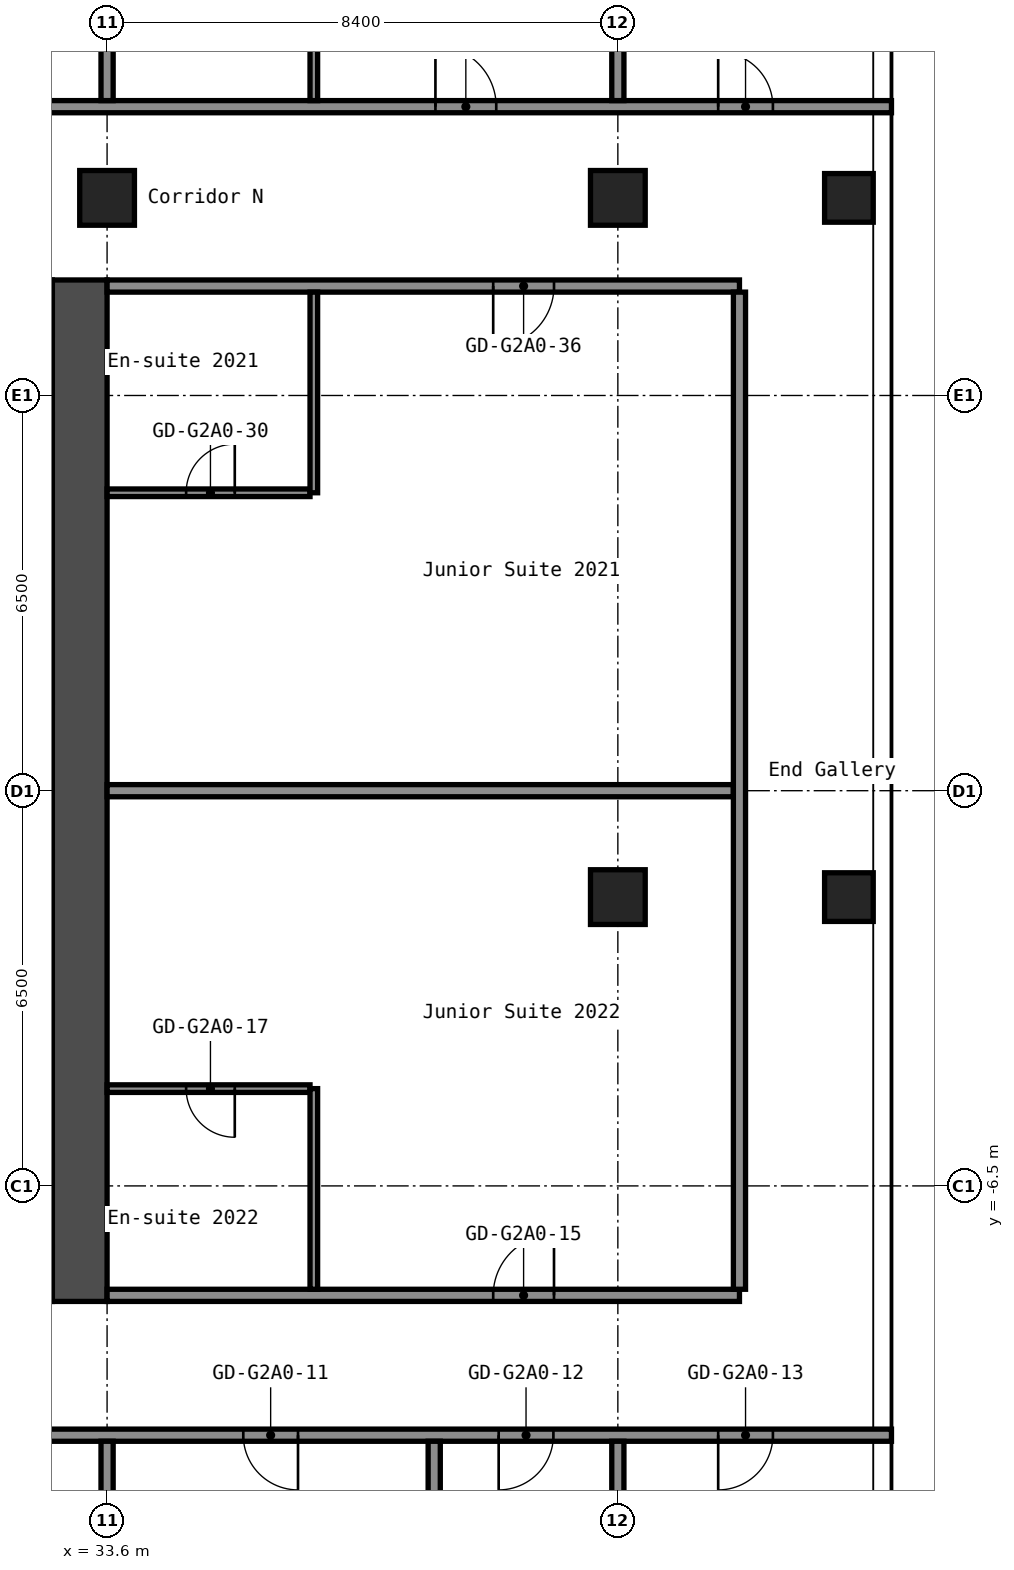
"""IFC4 building model, lengths in metres.
Left out: names, types, materials, properties, quantities, classifications, styles, units other than length and angle.
Written with IfcOpenShell. Run it as: python <this file> out.ifc"""

import sys

from ifc_helpers import new_model, si_unit, direction, frame, frame_2d, origin, origin_2d, place, context, subcontext, project, spatial, rectangle, hollow_rectangle, extrude, element, fill, save


model = new_model("IFC4")
c1 = context("Model", 3, precision=1e-05, world=origin(), true_north=direction((0.0, 1.0)))
c2 = subcontext(c1, "Body", "Model", "MODEL_VIEW")
j1 = project(units=[si_unit("LENGTHUNIT", "METRE"), si_unit("PLANEANGLEUNIT", "RADIAN")], contexts=[c1])
p1 = place(None, origin())
s1 = spatial("IfcSite", under=j1, at=p1, CompositionType="ELEMENT")
p2 = place(p1, origin())
s2 = spatial("IfcBuilding", under=s1, at=p2, CompositionType="ELEMENT")
p3 = place(p2, frame((0.0, 0.0, 75.4)))
s3 = spatial("IfcBuildingStorey", under=s2, at=p3, CompositionType="ELEMENT", Elevation=75.4)
for number, where, z_axis, x_axis in (
    (1, (33.6, 9.75, 0.0), (0.0, 0.0, 1.0), (1.0, 0.0, 0.0)),
    (2, (42.0, -1.75, 0.0), (0.0, 0.0, 1.0), (1.0, 0.0, 0.0)),
    (3, (42.0, 9.75, 0.0), (0.0, 0.0, 1.0), (1.0, 0.0, 0.0)),
):
    element("IfcColumn", number, at=place(p3, frame(where, z_axis=z_axis, x_axis=x_axis)), inside=s3, PredefinedType="COLUMN", context=c2, shape_type="SweptSolid", body=[
        extrude(hollow_rectangle(XDim=0.9, YDim=0.9, WallThickness=0.036, at=origin_2d()), origin(), (0.0, 0.0, 1.0), 2.8),
    ])
for number, where, z_axis, x_axis in (
    (4, (45.8, -1.75, 0.0), (0.0, 0.0, 1.0), (1.0, 0.0, 0.0)),
    (5, (45.8, 9.75, 0.0), (0.0, 0.0, 1.0), (1.0, 0.0, 0.0)),
):
    element("IfcColumn", number, at=place(p3, frame(where, z_axis=z_axis, x_axis=x_axis)), inside=s3, PredefinedType="COLUMN", context=c2, shape_type="SweptSolid", body=[
        extrude(hollow_rectangle(XDim=0.8, YDim=0.8, WallThickness=0.032, at=origin_2d()), origin(), (0.0, 0.0, 1.0), 2.8),
    ])
p4 = place(p3, frame((33.15, -8.4, 0.0), z_axis=(0.0, 0.0, 1.0), x_axis=(0.0, 1.0, 0.0)))
e6 = element("IfcWall", 6, at=p4, inside=s3, PredefinedType="SHEAR", context=c2, shape_type="SweptSolid", body=[
    extrude(rectangle(XDim=16.8, YDim=0.9, at=frame_2d((8.4, 0.0))), origin(), (0.0, 0.0, 1.0), 2.8),
])
p5 = place(p3, frame((16.8, -10.6, 0.0), z_axis=(0.0, 0.0, 1.0), x_axis=(1.0, 0.0, 0.0)))
e7 = element("IfcWall", 7, at=p5, inside=s3, PredefinedType="PARTITIONING", context=c2, shape_type="SweptSolid", body=[
    extrude(rectangle(XDim=29.7, YDim=0.2, at=frame_2d((14.85, 0.0))), origin(), (0.0, 0.0, 1.0), 2.8),
])
p6 = place(p5, frame((1.145, 0.0, 0.0)))
e8 = element("IfcOpeningElement", 8, at=p6, cuts=e7, PredefinedType="OPENING", context=c2, shape_type="SweptSolid", body=[
    extrude(rectangle(XDim=0.9, YDim=2.1, at=frame_2d((0.45, 1.05))), frame((0.0, 0.11, 0.0), z_axis=(0.0, -1.0, 0.0), x_axis=(1.0, 0.0, 0.0)), (0.0, 0.0, 1.0), 0.22),
])
p7 = place(p5, frame((5.345, 0.0, 0.0)))
e9 = element("IfcOpeningElement", 9, at=p7, cuts=e7, PredefinedType="OPENING", context=c2, shape_type="SweptSolid", body=[
    extrude(rectangle(XDim=0.9, YDim=2.1, at=frame_2d((0.45, 1.05))), frame((0.0, 0.11, 0.0), z_axis=(0.0, -1.0, 0.0), x_axis=(1.0, 0.0, 0.0)), (0.0, 0.0, 1.0), 0.22),
])
p8 = place(p5, frame((9.46, 0.0, 0.0)))
e10 = element("IfcOpeningElement", 10, at=p8, cuts=e7, PredefinedType="OPENING", context=c2, shape_type="SweptSolid", body=[
    extrude(rectangle(XDim=0.9, YDim=2.1, at=frame_2d((0.45, 1.05))), frame((0.0, 0.11, 0.0), z_axis=(0.0, -1.0, 0.0), x_axis=(1.0, 0.0, 0.0)), (0.0, 0.0, 1.0), 0.22),
])
p9 = place(p5, frame((13.66, 0.0, 0.0)))
e11 = element("IfcOpeningElement", 11, at=p9, cuts=e7, PredefinedType="OPENING", context=c2, shape_type="SweptSolid", body=[
    extrude(rectangle(XDim=0.9, YDim=2.1, at=frame_2d((0.45, 1.05))), frame((0.0, 0.11, 0.0), z_axis=(0.0, -1.0, 0.0), x_axis=(1.0, 0.0, 0.0)), (0.0, 0.0, 1.0), 0.22),
])
p10 = place(p5, frame((19.04, 0.0, 0.0)))
e12 = element("IfcOpeningElement", 12, at=p10, cuts=e7, PredefinedType="OPENING", context=c2, shape_type="SweptSolid", body=[
    extrude(rectangle(XDim=0.9, YDim=2.1, at=frame_2d((0.45, 1.05))), frame((0.0, 0.11, 0.0), z_axis=(0.0, -1.0, 0.0), x_axis=(1.0, 0.0, 0.0)), (0.0, 0.0, 1.0), 0.22),
])
p11 = place(p5, frame((23.24, 0.0, 0.0)))
e13 = element("IfcOpeningElement", 13, at=p11, cuts=e7, PredefinedType="OPENING", context=c2, shape_type="SweptSolid", body=[
    extrude(rectangle(XDim=0.9, YDim=2.1, at=frame_2d((0.45, 1.05))), frame((0.0, 0.11, 0.0), z_axis=(0.0, -1.0, 0.0), x_axis=(1.0, 0.0, 0.0)), (0.0, 0.0, 1.0), 0.22),
])
p12 = place(p5, frame((26.85, 0.0, 0.0)))
e14 = element("IfcOpeningElement", 14, at=p12, cuts=e7, PredefinedType="OPENING", context=c2, shape_type="SweptSolid", body=[
    extrude(rectangle(XDim=0.9, YDim=2.1, at=frame_2d((0.45, 1.05))), frame((0.0, 0.11, 0.0), z_axis=(0.0, -1.0, 0.0), x_axis=(1.0, 0.0, 0.0)), (0.0, 0.0, 1.0), 0.22),
])
p13 = place(p3, frame((33.6, -8.3, 0.0), z_axis=(0.0, 0.0, 1.0), x_axis=(1.0, 0.0, 0.0)))
e15 = element("IfcWall", 15, at=p13, inside=s3, PredefinedType="PARTITIONING", context=c2, shape_type="SweptSolid", body=[
    extrude(rectangle(XDim=10.4, YDim=0.2, at=frame_2d((5.2, 0.0))), origin(), (0.0, 0.0, 1.0), 2.8),
])
p14 = place(p13, frame((6.35, 0.0, 0.0)))
e16 = element("IfcOpeningElement", 16, at=p14, cuts=e15, PredefinedType="OPENING", context=c2, shape_type="SweptSolid", body=[
    extrude(rectangle(XDim=1.0, YDim=2.1, at=frame_2d((0.5, 1.05))), frame((0.0, 0.11, 0.0), z_axis=(0.0, -1.0, 0.0), x_axis=(1.0, 0.0, 0.0)), (0.0, 0.0, 1.0), 0.22),
])
p15 = place(p3, frame((33.6, -4.9, 0.0), z_axis=(0.0, 0.0, 1.0), x_axis=(1.0, 0.0, 0.0)))
e17 = element("IfcWall", 17, at=p15, inside=s3, PredefinedType="PARTITIONING", context=c2, shape_type="SweptSolid", body=[
    extrude(rectangle(XDim=3.337, YDim=0.125, at=frame_2d((1.669, 0.0))), origin(), (0.0, 0.0, 1.0), 2.8),
])
p16 = place(p15, frame((1.3, 0.0, 0.0)))
e18 = element("IfcOpeningElement", 18, at=p16, cuts=e17, PredefinedType="OPENING", context=c2, shape_type="SweptSolid", body=[
    extrude(rectangle(XDim=0.8, YDim=2.1, at=frame_2d((0.4, 1.05))), frame((0.0, 0.073, 0.0), z_axis=(0.0, -1.0, 0.0), x_axis=(1.0, 0.0, 0.0)), (0.0, 0.0, 1.0), 0.145),
])
p17 = place(p3, frame((33.6, 0.0, 0.0), z_axis=(0.0, 0.0, 1.0), x_axis=(1.0, 0.0, 0.0)))
e19 = element("IfcWall", 19, at=p17, inside=s3, PredefinedType="PARTITIONING", context=c2, shape_type="SweptSolid", body=[
    extrude(rectangle(XDim=10.3, YDim=0.2, at=frame_2d((5.15, 0.0))), origin(), (0.0, 0.0, 1.0), 2.8),
])
p18 = place(p3, frame((33.6, 4.9, 0.0), z_axis=(0.0, 0.0, 1.0), x_axis=(1.0, 0.0, 0.0)))
e20 = element("IfcWall", 20, at=p18, inside=s3, PredefinedType="PARTITIONING", context=c2, shape_type="SweptSolid", body=[
    extrude(rectangle(XDim=3.337, YDim=0.125, at=frame_2d((1.669, 0.0))), origin(), (0.0, 0.0, 1.0), 2.8),
])
p19 = place(p18, frame((1.3, 0.0, 0.0)))
e21 = element("IfcOpeningElement", 21, at=p19, cuts=e20, PredefinedType="OPENING", context=c2, shape_type="SweptSolid", body=[
    extrude(rectangle(XDim=0.8, YDim=2.1, at=frame_2d((0.4, 1.05))), frame((0.0, 0.073, 0.0), z_axis=(0.0, -1.0, 0.0), x_axis=(1.0, 0.0, 0.0)), (0.0, 0.0, 1.0), 0.145),
])
p20 = place(p3, frame((33.6, 8.3, 0.0), z_axis=(0.0, 0.0, 1.0), x_axis=(1.0, 0.0, 0.0)))
e22 = element("IfcWall", 22, at=p20, inside=s3, PredefinedType="PARTITIONING", context=c2, shape_type="SweptSolid", body=[
    extrude(rectangle(XDim=10.4, YDim=0.2, at=frame_2d((5.2, 0.0))), origin(), (0.0, 0.0, 1.0), 2.8),
])
p21 = place(p20, frame((6.35, 0.0, 0.0)))
e23 = element("IfcOpeningElement", 23, at=p21, cuts=e22, PredefinedType="OPENING", context=c2, shape_type="SweptSolid", body=[
    extrude(rectangle(XDim=1.0, YDim=2.1, at=frame_2d((0.5, 1.05))), frame((0.0, 0.11, 0.0), z_axis=(0.0, -1.0, 0.0), x_axis=(1.0, 0.0, 0.0)), (0.0, 0.0, 1.0), 0.22),
])
p22 = place(p3, frame((16.8, 11.25, 0.0), z_axis=(0.0, 0.0, 1.0), x_axis=(1.0, 0.0, 0.0)))
e24 = element("IfcWall", 24, at=p22, inside=s3, PredefinedType="PARTITIONING", context=c2, shape_type="SweptSolid", body=[
    extrude(rectangle(XDim=29.7, YDim=0.2, at=frame_2d((14.85, 0.0))), origin(), (0.0, 0.0, 1.0), 2.8),
])
p23 = place(p22, frame((5.4, 0.0, 0.0)))
e25 = element("IfcOpeningElement", 25, at=p23, cuts=e24, PredefinedType="OPENING", context=c2, shape_type="SweptSolid", body=[
    extrude(rectangle(XDim=1.0, YDim=2.1, at=frame_2d((0.5, 1.05))), frame((0.0, 0.11, 0.0), z_axis=(0.0, -1.0, 0.0), x_axis=(1.0, 0.0, 0.0)), (0.0, 0.0, 1.0), 0.22),
])
p24 = place(p22, frame((13.8, 0.0, 0.0)))
e26 = element("IfcOpeningElement", 26, at=p24, cuts=e24, PredefinedType="OPENING", context=c2, shape_type="SweptSolid", body=[
    extrude(rectangle(XDim=1.0, YDim=2.1, at=frame_2d((0.5, 1.05))), frame((0.0, 0.11, 0.0), z_axis=(0.0, -1.0, 0.0), x_axis=(1.0, 0.0, 0.0)), (0.0, 0.0, 1.0), 0.22),
])
p25 = place(p22, frame((22.2, 0.0, 0.0)))
e27 = element("IfcOpeningElement", 27, at=p25, cuts=e24, PredefinedType="OPENING", context=c2, shape_type="SweptSolid", body=[
    extrude(rectangle(XDim=1.0, YDim=2.1, at=frame_2d((0.5, 1.05))), frame((0.0, 0.11, 0.0), z_axis=(0.0, -1.0, 0.0), x_axis=(1.0, 0.0, 0.0)), (0.0, 0.0, 1.0), 0.22),
])
p26 = place(p22, frame((26.85, 0.0, 0.0)))
e28 = element("IfcOpeningElement", 28, at=p26, cuts=e24, PredefinedType="OPENING", context=c2, shape_type="SweptSolid", body=[
    extrude(rectangle(XDim=0.9, YDim=2.1, at=frame_2d((0.45, 1.05))), frame((0.0, 0.11, 0.0), z_axis=(0.0, -1.0, 0.0), x_axis=(1.0, 0.0, 0.0)), (0.0, 0.0, 1.0), 0.22),
])
p27 = place(p3, frame((33.6, -15.55, 0.0), z_axis=(0.0, 0.0, 1.0), x_axis=(0.0, 1.0, 0.0)))
e29 = element("IfcWall", 29, at=p27, inside=s3, PredefinedType="PARTITIONING", context=c2, shape_type="SweptSolid", body=[
    extrude(rectangle(XDim=4.85, YDim=0.2, at=frame_2d((2.425, 0.0))), origin(), (0.0, 0.0, 1.0), 2.8),
])
p28 = place(p3, frame((33.6, 11.35, 0.0), z_axis=(0.0, 0.0, 1.0), x_axis=(0.0, 1.0, 0.0)))
e30 = element("IfcWall", 30, at=p28, inside=s3, PredefinedType="PARTITIONING", context=c2, shape_type="SweptSolid", body=[
    extrude(rectangle(XDim=12.2, YDim=0.2, at=frame_2d((6.1, 0.0))), origin(), (0.0, 0.0, 1.0), 2.8),
])
for number, where, z_axis, x_axis in (
    (31, (37.0, -8.2, 0.0), (0.0, 0.0, 1.0), (0.0, 1.0, 0.0)),
    (32, (37.0, 4.9, 0.0), (0.0, 0.0, 1.0), (0.0, 1.0, 0.0)),
):
    element("IfcWall", number, at=place(p3, frame(where, z_axis=z_axis, x_axis=x_axis)), inside=s3, PredefinedType="PARTITIONING", context=c2, shape_type="SweptSolid", body=[
        extrude(rectangle(XDim=3.3, YDim=0.125, at=frame_2d((1.65, 0.0))), origin(), (0.0, 0.0, 1.0), 2.8),
    ])
p29 = place(p3, frame((37.0, 11.35, 0.0), z_axis=(0.0, 0.0, 1.0), x_axis=(0.0, 1.0, 0.0)))
e33 = element("IfcWall", 33, at=p29, inside=s3, PredefinedType="PARTITIONING", context=c2, shape_type="SweptSolid", body=[
    extrude(rectangle(XDim=3.3, YDim=0.125, at=frame_2d((1.65, 0.0))), origin(), (0.0, 0.0, 1.0), 2.8),
])
for number, where, z_axis, x_axis in (
    (34, (38.98, -15.55, 0.0), (0.0, 0.0, 1.0), (0.0, 1.0, 0.0)),
    (35, (42.0, -15.55, 0.0), (0.0, 0.0, 1.0), (0.0, 1.0, 0.0)),
):
    element("IfcWall", number, at=place(p3, frame(where, z_axis=z_axis, x_axis=x_axis)), inside=s3, PredefinedType="PARTITIONING", context=c2, shape_type="SweptSolid", body=[
        extrude(rectangle(XDim=4.85, YDim=0.2, at=frame_2d((2.425, 0.0))), origin(), (0.0, 0.0, 1.0), 2.8),
    ])
p30 = place(p3, frame((42.0, 11.35, 0.0), z_axis=(0.0, 0.0, 1.0), x_axis=(0.0, 1.0, 0.0)))
e36 = element("IfcWall", 36, at=p30, inside=s3, PredefinedType="PARTITIONING", context=c2, shape_type="SweptSolid", body=[
    extrude(rectangle(XDim=12.2, YDim=0.2, at=frame_2d((6.1, 0.0))), origin(), (0.0, 0.0, 1.0), 2.8),
])
p31 = place(p3, frame((44.0, -8.2, 0.0), z_axis=(0.0, 0.0, 1.0), x_axis=(0.0, 1.0, 0.0)))
e37 = element("IfcWall", 37, at=p31, inside=s3, PredefinedType="PARTITIONING", context=c2, shape_type="SweptSolid", body=[
    extrude(rectangle(XDim=16.4, YDim=0.2, at=frame_2d((8.2, 0.0))), origin(), (0.0, 0.0, 1.0), 2.8),
])
p32 = place(p10, origin())
e38 = element("IfcDoor", 38, at=p32, inside=s3, OperationType="SINGLE_SWING_RIGHT", PredefinedType="DOOR", context=c2, shape_type="SweptSolid", body=[
    extrude(rectangle(XDim=0.9, YDim=2.1, at=frame_2d((0.45, 1.05))), frame((0.0, 0.025, 0.0), z_axis=(0.0, -1.0, 0.0), x_axis=(1.0, 0.0, 0.0)), (0.0, 0.0, 1.0), 0.05),
])
fill(e12, e38)
p33 = place(p11, origin())
e39 = element("IfcDoor", 39, at=p33, inside=s3, OperationType="SINGLE_SWING_LEFT", PredefinedType="DOOR", context=c2, shape_type="SweptSolid", body=[
    extrude(rectangle(XDim=0.9, YDim=2.1, at=frame_2d((0.45, 1.05))), frame((0.0, 0.025, 0.0), z_axis=(0.0, -1.0, 0.0), x_axis=(1.0, 0.0, 0.0)), (0.0, 0.0, 1.0), 0.05),
])
fill(e13, e39)
p34 = place(p12, origin())
e40 = element("IfcDoor", 40, at=p34, inside=s3, OperationType="SINGLE_SWING_LEFT", PredefinedType="DOOR", context=c2, shape_type="SweptSolid", body=[
    extrude(rectangle(XDim=0.9, YDim=2.1, at=frame_2d((0.45, 1.05))), frame((0.0, 0.025, 0.0), z_axis=(0.0, -1.0, 0.0), x_axis=(1.0, 0.0, 0.0)), (0.0, 0.0, 1.0), 0.05),
])
fill(e14, e40)
p35 = place(p14, origin())
e41 = element("IfcDoor", 41, at=p35, inside=s3, OperationType="SINGLE_SWING_LEFT", PredefinedType="DOOR", context=c2, shape_type="SweptSolid", body=[
    extrude(rectangle(XDim=1.0, YDim=2.1, at=frame_2d((0.5, 1.05))), frame((0.0, 0.025, 0.0), z_axis=(0.0, -1.0, 0.0), x_axis=(1.0, 0.0, 0.0)), (0.0, 0.0, 1.0), 0.05),
])
fill(e16, e41)
p36 = place(p16, origin())
e42 = element("IfcDoor", 42, at=p36, inside=s3, OperationType="SINGLE_SWING_RIGHT", PredefinedType="DOOR", context=c2, shape_type="SweptSolid", body=[
    extrude(rectangle(XDim=0.8, YDim=2.1, at=frame_2d((0.4, 1.05))), frame((0.0, 0.025, 0.0), z_axis=(0.0, -1.0, 0.0), x_axis=(1.0, 0.0, 0.0)), (0.0, 0.0, 1.0), 0.05),
])
fill(e18, e42)
p37 = place(p19, origin())
e43 = element("IfcDoor", 43, at=p37, inside=s3, OperationType="SINGLE_SWING_LEFT", PredefinedType="DOOR", context=c2, shape_type="SweptSolid", body=[
    extrude(rectangle(XDim=0.8, YDim=2.1, at=frame_2d((0.4, 1.05))), frame((0.0, 0.025, 0.0), z_axis=(0.0, -1.0, 0.0), x_axis=(1.0, 0.0, 0.0)), (0.0, 0.0, 1.0), 0.05),
])
fill(e21, e43)
p38 = place(p21, origin())
e44 = element("IfcDoor", 44, at=p38, inside=s3, OperationType="SINGLE_SWING_LEFT", PredefinedType="DOOR", context=c2, shape_type="SweptSolid", body=[
    extrude(rectangle(XDim=1.0, YDim=2.1, at=frame_2d((0.5, 1.05))), frame((0.0, 0.025, 0.0), z_axis=(0.0, -1.0, 0.0), x_axis=(1.0, 0.0, 0.0)), (0.0, 0.0, 1.0), 0.05),
])
fill(e23, e44)
p39 = place(p25, origin())
e45 = element("IfcDoor", 45, at=p39, inside=s3, OperationType="SINGLE_SWING_RIGHT", PredefinedType="DOOR", context=c2, shape_type="SweptSolid", body=[
    extrude(rectangle(XDim=1.0, YDim=2.1, at=frame_2d((0.5, 1.05))), frame((0.0, 0.025, 0.0), z_axis=(0.0, -1.0, 0.0), x_axis=(1.0, 0.0, 0.0)), (0.0, 0.0, 1.0), 0.05),
])
fill(e27, e45)
p40 = place(p26, origin())
e46 = element("IfcDoor", 46, at=p40, inside=s3, OperationType="SINGLE_SWING_RIGHT", PredefinedType="DOOR", context=c2, shape_type="SweptSolid", body=[
    extrude(rectangle(XDim=0.9, YDim=2.1, at=frame_2d((0.45, 1.05))), frame((0.0, 0.025, 0.0), z_axis=(0.0, -1.0, 0.0), x_axis=(1.0, 0.0, 0.0)), (0.0, 0.0, 1.0), 0.05),
])
fill(e28, e46)
save(model, sys.argv[1])
